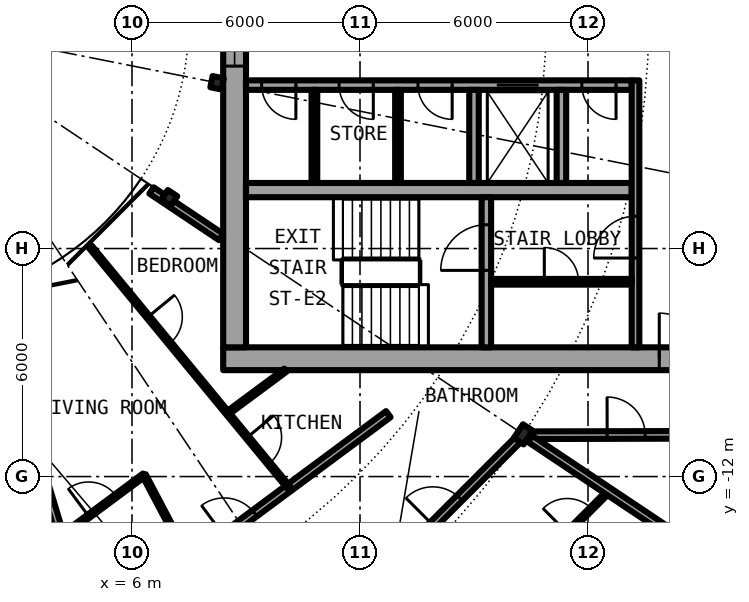
"""IFC4 building model, lengths in metres.
Left out: names, types, materials, properties, quantities, classifications, styles, units other than length and angle.
Written with IfcOpenShell. Run it as: python <this file> out.ifc"""

import sys

from ifc_helpers import new_model, si_unit, direction, frame, frame_2d, origin, origin_2d, place, context, subcontext, project, spatial, rectangle, i_section, extrude, element, fill, save


model = new_model("IFC4")
c1 = context("Model", 3, precision=1e-05, world=origin(), true_north=direction((0.0, 1.0)))
c2 = subcontext(c1, "Body", "Model", "MODEL_VIEW")
j1 = project(units=[si_unit("LENGTHUNIT", "METRE"), si_unit("PLANEANGLEUNIT", "RADIAN")], contexts=[c1])
p1 = place(None, origin())
s1 = spatial("IfcSite", under=j1, at=p1, CompositionType="ELEMENT")
p2 = place(p1, origin())
s2 = spatial("IfcBuilding", under=s1, at=p2, CompositionType="ELEMENT")
p3 = place(p2, frame((0.0, 0.0, 123.85)))
s3 = spatial("IfcBuildingStorey", under=s2, at=p3, CompositionType="ELEMENT", Elevation=123.85)
p4 = place(p3, frame((16.297, -10.889, 0.0), z_axis=(0.0, 0.0, 1.0), x_axis=(0.831469612303, -0.55557023302, 0.0)))
e1 = element("IfcColumn", 1, at=p4, inside=s3, PredefinedType="COLUMN", context=c2, shape_type="SweptSolid", body=[
    extrude(i_section(OverallWidth=0.307, OverallDepth=0.432, WebThickness=0.021, FlangeThickness=0.04, FilletRadius=0.027, at=origin_2d()), origin(), (0.0, 0.0, 1.0), 3.05),
])
for number, where, z_axis, x_axis in (
    (2, (6.984, -4.667, 0.0), (0.0, 0.0, 1.0), (0.831, -0.556, 0.0)),
    (3, (8.239, -1.639, 0.0), (0.0, 0.0, 1.0), (0.981, -0.195, 0.0)),
):
    element("IfcColumn", number, at=place(p3, frame(where, z_axis=z_axis, x_axis=x_axis)), inside=s3, PredefinedType="COLUMN", context=c2, shape_type="SweptSolid", body=[
        extrude(i_section(OverallWidth=0.3, OverallDepth=0.3, WebThickness=0.011, FlangeThickness=0.019, FilletRadius=0.027, at=origin_2d()), origin(), (0.0, 0.0, 1.0), 3.05),
    ])
p5 = place(p3, frame((8.4, -8.9, 0.0), z_axis=(0.0, 0.0, 1.0), x_axis=(1.0, 0.0, 0.0)))
e4 = element("IfcWall", 4, at=p5, inside=s3, PredefinedType="SHEAR", context=c2, shape_type="SweptSolid", body=[
    extrude(rectangle(XDim=13.8, YDim=0.6, at=frame_2d((6.9, 0.0))), origin(), (0.0, 0.0, 1.0), 3.05),
])
p6 = place(p5, frame((11.475, 0.0, 0.0)))
e5 = element("IfcOpeningElement", 5, at=p6, cuts=e4, PredefinedType="OPENING", context=c2, shape_type="SweptSolid", body=[
    extrude(rectangle(XDim=1.2, YDim=2.3, at=frame_2d((0.6, 1.15))), frame((0.0, 0.31, 0.0), z_axis=(0.0, -1.0, 0.0), x_axis=(1.0, 0.0, 0.0)), (0.0, 0.0, 1.0), 0.62),
])
p7 = place(p3, frame((8.7, -8.6, 0.0), z_axis=(0.0, 0.0, 1.0), x_axis=(0.0, 1.0, 0.0)))
e6 = element("IfcWall", 6, at=p7, inside=s3, PredefinedType="SHEAR", context=c2, shape_type="SweptSolid", body=[
    extrude(rectangle(XDim=17.2, YDim=0.6, at=frame_2d((8.6, 0.0))), origin(), (0.0, 0.0, 1.0), 3.05),
])
p8 = place(p7, frame((7.4, 0.0, 0.1)))
e7 = element("IfcOpeningElement", 7, at=p8, cuts=e6, PredefinedType="OPENING", context=c2, shape_type="SweptSolid", body=[
    extrude(rectangle(XDim=2.4, YDim=2.2, at=frame_2d((1.2, 1.1))), frame((0.0, 0.31, 0.0), z_axis=(0.0, -1.0, 0.0), x_axis=(1.0, 0.0, 0.0)), (0.0, 0.0, 1.0), 0.62),
])
p9 = place(p3, frame((19.15, -1.7, 0.0), z_axis=(0.0, 0.0, 1.0), x_axis=(-1.0, 0.0, 0.0)))
e8 = element("IfcWall", 8, at=p9, inside=s3, PredefinedType="SHEAR", context=c2, shape_type="SweptSolid", body=[
    extrude(rectangle(XDim=10.15, YDim=0.25, at=frame_2d((5.075, 0.0))), origin(), (0.0, 0.0, 1.0), 3.05),
])
p10 = place(p9, frame((2.45, 0.0, 0.0)))
e9 = element("IfcOpeningElement", 9, at=p10, cuts=e8, PredefinedType="OPENING", context=c2, shape_type="SweptSolid", body=[
    extrude(rectangle(XDim=1.1, YDim=2.3, at=frame_2d((0.55, 1.15))), frame((0.0, 0.135, 0.0), z_axis=(0.0, -1.0, 0.0), x_axis=(1.0, 0.0, 0.0)), (0.0, 0.0, 1.0), 0.27),
])
p11 = place(p9, frame((8.837, 0.0, 0.0)))
e10 = element("IfcOpeningElement", 10, at=p11, cuts=e8, PredefinedType="OPENING", context=c2, shape_type="SweptSolid", body=[
    extrude(rectangle(XDim=0.9, YDim=2.3, at=frame_2d((0.45, 1.15))), frame((0.0, 0.135, 0.0), z_axis=(0.0, -1.0, 0.0), x_axis=(1.0, 0.0, 0.0)), (0.0, 0.0, 1.0), 0.27),
])
p12 = place(p9, frame((6.8, 0.0, 0.0)))
e11 = element("IfcOpeningElement", 11, at=p12, cuts=e8, PredefinedType="OPENING", context=c2, shape_type="SweptSolid", body=[
    extrude(rectangle(XDim=0.9, YDim=2.3, at=frame_2d((0.45, 1.15))), frame((0.0, 0.135, 0.0), z_axis=(0.0, -1.0, 0.0), x_axis=(1.0, 0.0, 0.0)), (0.0, 0.0, 1.0), 0.27),
])
p13 = place(p9, frame((4.725, 0.0, 0.0)))
e12 = element("IfcOpeningElement", 12, at=p13, cuts=e8, PredefinedType="OPENING", context=c2, shape_type="SweptSolid", body=[
    extrude(rectangle(XDim=0.9, YDim=2.3, at=frame_2d((0.45, 1.15))), frame((0.0, 0.135, 0.0), z_axis=(0.0, -1.0, 0.0), x_axis=(1.0, 0.0, 0.0)), (0.0, 0.0, 1.0), 0.27),
])
p14 = place(p9, frame((0.413, 0.0, 0.0)))
e13 = element("IfcOpeningElement", 13, at=p14, cuts=e8, PredefinedType="OPENING", context=c2, shape_type="SweptSolid", body=[
    extrude(rectangle(XDim=0.9, YDim=2.3, at=frame_2d((0.45, 1.15))), frame((0.0, 0.135, 0.0), z_axis=(0.0, -1.0, 0.0), x_axis=(1.0, 0.0, 0.0)), (0.0, 0.0, 1.0), 0.27),
])
p15 = place(p3, frame((9.0, -4.462, 0.0), z_axis=(0.0, 0.0, 1.0), x_axis=(1.0, 0.0, 0.0)))
e14 = element("IfcWall", 14, at=p15, inside=s3, PredefinedType="SHEAR", context=c2, shape_type="SweptSolid", body=[
    extrude(rectangle(XDim=10.15, YDim=0.375, at=frame_2d((5.075, 0.0))), origin(), (0.0, 0.0, 1.0), 3.05),
])
p16 = place(p3, frame((15.325, -8.6, 0.0), z_axis=(0.0, 0.0, 1.0), x_axis=(0.0, 1.0, 0.0)))
e15 = element("IfcWall", 15, at=p16, inside=s3, PredefinedType="SHEAR", context=c2, shape_type="SweptSolid", body=[
    extrude(rectangle(XDim=3.95, YDim=0.25, at=frame_2d((1.975, 0.0))), origin(), (0.0, 0.0, 1.0), 3.05),
])
p17 = place(p16, frame((2.025, 0.0, 0.0)))
e16 = element("IfcOpeningElement", 16, at=p17, cuts=e15, PredefinedType="OPENING", context=c2, shape_type="SweptSolid", body=[
    extrude(rectangle(XDim=1.2, YDim=2.3, at=frame_2d((0.6, 1.15))), frame((0.0, 0.135, 0.0), z_axis=(0.0, -1.0, 0.0), x_axis=(1.0, 0.0, 0.0)), (0.0, 0.0, 1.0), 0.27),
])
for number, where, z_axis, x_axis in (
    (17, (15.0, -1.825, 0.0), (0.0, 0.0, 1.0), (0.0, -1.0, 0.0)),
    (18, (17.3, -1.825, 0.0), (0.0, 0.0, 1.0), (0.0, -1.0, 0.0)),
):
    element("IfcWall", number, at=place(p3, frame(where, z_axis=z_axis, x_axis=x_axis)), inside=s3, PredefinedType="SOLIDWALL", context=c2, shape_type="SweptSolid", body=[
        extrude(rectangle(XDim=2.45, YDim=0.25, at=frame_2d((1.225, 0.0))), origin(), (0.0, 0.0, 1.0), 2.7),
    ])
p18 = place(p3, frame((19.25, -8.6, 0.0), z_axis=(0.0, 0.0, 1.0), x_axis=(0.0, 1.0, 0.0)))
e19 = element("IfcWall", 19, at=p18, inside=s3, PredefinedType="SOLIDWALL", context=c2, shape_type="SweptSolid", body=[
    extrude(rectangle(XDim=7.025, YDim=0.2, at=frame_2d((3.513, 0.0))), origin(), (0.0, 0.0, 1.0), 2.7),
])
p19 = place(p18, frame((2.35, 0.0, 0.0)))
e20 = element("IfcOpeningElement", 20, at=p19, cuts=e19, PredefinedType="OPENING", context=c2, shape_type="SweptSolid", body=[
    extrude(rectangle(XDim=1.1, YDim=2.3, at=frame_2d((0.55, 1.15))), frame((0.0, 0.11, 0.0), z_axis=(0.0, -1.0, 0.0), x_axis=(1.0, 0.0, 0.0)), (0.0, 0.0, 1.0), 0.22),
])
for number, where, z_axis, x_axis in (
    (21, (10.8, -1.825, 0.0), (0.0, 0.0, 1.0), (0.0, -1.0, 0.0)),
    (22, (13.0, -1.825, 0.0), (0.0, 0.0, 1.0), (0.0, -1.0, 0.0)),
):
    element("IfcWall", number, at=place(p3, frame(where, z_axis=z_axis, x_axis=x_axis)), inside=s3, PredefinedType="PARTITIONING", context=c2, shape_type="SweptSolid", body=[
        extrude(rectangle(XDim=2.45, YDim=0.15, at=frame_2d((1.225, 0.0))), origin(), (0.0, 0.0, 1.0), 2.7),
    ])
p20 = place(p3, frame((15.45, -6.875, 0.0), z_axis=(0.0, 0.0, 1.0), x_axis=(1.0, 0.0, 0.0)))
e23 = element("IfcWall", 23, at=p20, inside=s3, PredefinedType="PARTITIONING", context=c2, shape_type="SweptSolid", body=[
    extrude(rectangle(XDim=3.7, YDim=0.15, at=frame_2d((1.85, 0.0))), origin(), (0.0, 0.0, 1.0), 2.7),
])
p21 = place(p20, frame((1.4, 0.0, 0.0)))
e24 = element("IfcOpeningElement", 24, at=p21, cuts=e23, PredefinedType="OPENING", context=c2, shape_type="SweptSolid", body=[
    extrude(rectangle(XDim=0.9, YDim=2.3, at=frame_2d((0.45, 1.15))), frame((0.0, 0.085, 0.0), z_axis=(0.0, -1.0, 0.0), x_axis=(1.0, 0.0, 0.0)), (0.0, 0.0, 1.0), 0.17),
])
p22 = place(p3, frame((15.468, -15.463, 0.0), z_axis=(0.0, 0.0, 1.0), x_axis=(0.707106781187, 0.707106781187, 0.0)))
e25 = element("IfcWall", 25, at=p22, inside=s3, PredefinedType="PARTITIONING", context=c2, shape_type="SweptSolid", body=[
    extrude(rectangle(XDim=4.351, YDim=0.1, at=frame_2d((2.176, 0.0))), origin(), (0.0, 0.0, 1.0), 2.7),
])
p23 = place(p22, frame((2.808, 0.0, 0.0)))
e26 = element("IfcOpeningElement", 26, at=p23, cuts=e25, PredefinedType="OPENING", context=c2, shape_type="SweptSolid", body=[
    extrude(rectangle(XDim=0.9, YDim=2.3, at=frame_2d((0.45, 1.15))), frame((0.0, 0.06, 0.0), z_axis=(0.0, -1.0, 0.0), x_axis=(1.0, 0.0, 0.0)), (0.0, 0.0, 1.0), 0.12),
])
p24 = place(p3, frame((11.0, -16.186, 0.0), z_axis=(0.0, 0.0, 1.0), x_axis=(0.707106781187, 0.707106781187, 0.0)))
e27 = element("IfcWall", 27, at=p24, inside=s3, PredefinedType="PARTITIONING", context=c2, shape_type="SweptSolid", body=[
    extrude(rectangle(XDim=7.334, YDim=0.2, at=frame_2d((3.667, 0.0))), origin(), (0.0, 0.0, 1.0), 2.39),
])
p25 = place(p24, frame((4.123, 0.0, 0.0)))
e28 = element("IfcOpeningElement", 28, at=p25, cuts=e27, PredefinedType="OPENING", context=c2, shape_type="SweptSolid", body=[
    extrude(rectangle(XDim=1.0, YDim=2.3, at=frame_2d((0.5, 1.15))), frame((0.0, 0.11, 0.0), z_axis=(0.0, -1.0, 0.0), x_axis=(1.0, 0.0, 0.0)), (0.0, 0.0, 1.0), 0.22),
])
p26 = place(p3, frame((4.906, -16.172, 0.0), z_axis=(0.0, 0.0, 1.0), x_axis=(0.803191461888, 0.595720971219, 0.0)))
e29 = element("IfcWall", 29, at=p26, inside=s3, PredefinedType="PARTITIONING", context=c2, shape_type="SweptSolid", body=[
    extrude(rectangle(XDim=9.76, YDim=0.2, at=frame_2d((4.88, 0.0))), origin(), (0.0, 0.0, 1.0), 2.7),
])
p27 = place(p26, frame((4.38, 0.0, 0.0)))
e30 = element("IfcOpeningElement", 30, at=p27, cuts=e29, PredefinedType="OPENING", context=c2, shape_type="SweptSolid", body=[
    extrude(rectangle(XDim=1.0, YDim=2.3, at=frame_2d((0.5, 1.15))), frame((0.0, 0.11, 0.0), z_axis=(0.0, -1.0, 0.0), x_axis=(1.0, 0.0, 0.0)), (0.0, 0.0, 1.0), 0.22),
])
p28 = place(p3, frame((4.122, -13.589, 0.0), z_axis=(0.0, 0.0, 1.0), x_axis=(0.803128348509, 0.595806055542, 0.0)))
e31 = element("IfcWall", 31, at=p28, inside=s3, PredefinedType="PARTITIONING", context=c2, shape_type="SweptSolid", body=[
    extrude(rectangle(XDim=2.734, YDim=0.1, at=frame_2d((1.367, 0.0))), origin(), (0.0, 0.0, 1.0), 2.7),
])
p29 = place(p28, frame((0.917, 0.0, 0.0)))
e32 = element("IfcOpeningElement", 32, at=p29, cuts=e31, PredefinedType="OPENING", context=c2, shape_type="SweptSolid", body=[
    extrude(rectangle(XDim=0.9, YDim=2.3, at=frame_2d((0.45, 1.15))), frame((0.0, 0.06, 0.0), z_axis=(0.0, -1.0, 0.0), x_axis=(1.0, 0.0, 0.0)), (0.0, 0.0, 1.0), 0.12),
])
p30 = place(p3, frame((8.513, -10.332, 0.0), z_axis=(0.0, 0.0, 1.0), x_axis=(0.803149591038, 0.595777420196, 0.0)))
e33 = element("IfcWall", 33, at=p30, inside=s3, PredefinedType="PARTITIONING", context=c2, shape_type="SweptSolid", body=[
    extrude(rectangle(XDim=1.9, YDim=0.1, at=frame_2d((0.95, 0.0))), origin(), (0.0, 0.0, 1.0), 2.7),
])
p31 = place(p3, frame((16.541, -10.912, 0.0), z_axis=(0.0, 0.0, 1.0), x_axis=(0.999997173357, 0.002377662213, 0.0)))
e34 = element("IfcWall", 34, at=p31, inside=s3, PredefinedType="PARTITIONING", context=c2, shape_type="SweptSolid", body=[
    extrude(rectangle(XDim=5.134, YDim=0.2, at=frame_2d((2.567, 0.0))), origin(), (0.0, 0.0, 1.0), 2.7),
])
p32 = place(p31, frame((1.963, 0.0, 0.0)))
e35 = element("IfcOpeningElement", 35, at=p32, cuts=e34, PredefinedType="OPENING", context=c2, shape_type="SweptSolid", body=[
    extrude(rectangle(XDim=1.0, YDim=2.3, at=frame_2d((0.5, 1.15))), frame((0.0, 0.11, 0.0), z_axis=(0.0, -1.0, 0.0), x_axis=(1.0, 0.0, 0.0)), (0.0, 0.0, 1.0), 0.22),
])
p33 = place(p3, frame((6.513, -4.472, 0.0), z_axis=(0.0, 0.0, 1.0), x_axis=(0.831333375071, -0.555774072347, 0.0)))
e36 = element("IfcWall", 36, at=p33, inside=s3, PredefinedType="PARTITIONING", context=c2, shape_type="SweptSolid", body=[
    extrude(rectangle(XDim=2.203, YDim=0.2, at=frame_2d((1.101, 0.0))), origin(), (0.0, 0.0, 1.0), 2.7),
])
p34 = place(p3, frame((2.24, -7.388, 0.0), z_axis=(0.0, 0.0, 1.0), x_axis=(0.290420725025, -0.956899055531, 0.0)))
e37 = element("IfcWall", 37, at=p34, inside=s3, PredefinedType="PARTITIONING", context=c2, shape_type="SweptSolid", body=[
    extrude(rectangle(XDim=9.18, YDim=0.2, at=frame_2d((4.59, 0.0))), origin(), (0.0, 0.0, 1.0), 2.7),
])
p35 = place(p3, frame((4.908, -5.959, 0.0), z_axis=(0.0, 0.0, 1.0), x_axis=(0.636105207978, -0.771602335652, 0.0)))
e38 = element("IfcWall", 38, at=p35, inside=s3, PredefinedType="PARTITIONING", context=c2, shape_type="SweptSolid", body=[
    extrude(rectangle(XDim=8.213, YDim=0.1, at=frame_2d((4.106, 0.0))), origin(), (0.0, 0.0, 1.0), 2.7),
])
p36 = place(p35, frame((6.49, 0.0, 0.0)))
e39 = element("IfcOpeningElement", 39, at=p36, cuts=e38, PredefinedType="OPENING", context=c2, shape_type="SweptSolid", body=[
    extrude(rectangle(XDim=0.9, YDim=2.3, at=frame_2d((0.45, 1.15))), frame((0.0, 0.06, 0.0), z_axis=(0.0, -1.0, 0.0), x_axis=(1.0, 0.0, 0.0)), (0.0, 0.0, 1.0), 0.12),
])
p37 = place(p35, frame((2.384, 0.0, 0.0)))
e40 = element("IfcOpeningElement", 40, at=p37, cuts=e38, PredefinedType="OPENING", context=c2, shape_type="SweptSolid", body=[
    extrude(rectangle(XDim=0.9, YDim=2.3, at=frame_2d((0.45, 1.15))), frame((0.0, 0.06, 0.0), z_axis=(0.0, -1.0, 0.0), x_axis=(1.0, 0.0, 0.0)), (0.0, 0.0, 1.0), 0.12),
])
p38 = place(p3, frame((6.316, -11.961, 0.0), z_axis=(0.0, 0.0, 1.0), x_axis=(0.467037016128, -0.884237765291, 0.0)))
e41 = element("IfcWall", 41, at=p38, inside=s3, PredefinedType="PARTITIONING", context=c2, shape_type="SweptSolid", body=[
    extrude(rectangle(XDim=2.572, YDim=0.1, at=frame_2d((1.286, 0.0))), origin(), (0.0, 0.0, 1.0), 2.7),
])
p39 = place(p3, frame((16.477, -11.009, 0.0), z_axis=(0.0, 0.0, 1.0), x_axis=(0.831467903109, -0.555572791, 0.0)))
e42 = element("IfcWall", 42, at=p39, inside=s3, PredefinedType="PARTITIONING", context=c2, shape_type="SweptSolid", body=[
    extrude(rectangle(XDim=7.358, YDim=0.2, at=frame_2d((3.679, 0.0))), origin(), (0.0, 0.0, 1.0), 2.7),
])
p40 = place(p10, origin())
e43 = element("IfcDoor", 43, at=p40, inside=s3, OperationType="DOUBLE_DOOR_SLIDING", PredefinedType="DOOR", context=c2, shape_type="SweptSolid", body=[
    extrude(rectangle(XDim=1.1, YDim=2.3, at=frame_2d((0.55, 1.15))), frame((0.0, 0.025, 0.0), z_axis=(0.0, -1.0, 0.0), x_axis=(1.0, 0.0, 0.0)), (0.0, 0.0, 1.0), 0.05),
])
fill(e9, e43)
p41 = place(p11, origin())
e44 = element("IfcDoor", 44, at=p41, inside=s3, OperationType="SINGLE_SWING_LEFT", PredefinedType="DOOR", context=c2, shape_type="SweptSolid", body=[
    extrude(rectangle(XDim=0.9, YDim=2.3, at=frame_2d((0.45, 1.15))), frame((0.0, 0.025, 0.0), z_axis=(0.0, -1.0, 0.0), x_axis=(1.0, 0.0, 0.0)), (0.0, 0.0, 1.0), 0.05),
])
fill(e10, e44)
p42 = place(p12, origin())
e45 = element("IfcDoor", 45, at=p42, inside=s3, OperationType="SINGLE_SWING_LEFT", PredefinedType="DOOR", context=c2, shape_type="SweptSolid", body=[
    extrude(rectangle(XDim=0.9, YDim=2.3, at=frame_2d((0.45, 1.15))), frame((0.0, 0.025, 0.0), z_axis=(0.0, -1.0, 0.0), x_axis=(1.0, 0.0, 0.0)), (0.0, 0.0, 1.0), 0.05),
])
fill(e11, e45)
p43 = place(p13, origin())
e46 = element("IfcDoor", 46, at=p43, inside=s3, OperationType="SINGLE_SWING_LEFT", PredefinedType="DOOR", context=c2, shape_type="SweptSolid", body=[
    extrude(rectangle(XDim=0.9, YDim=2.3, at=frame_2d((0.45, 1.15))), frame((0.0, 0.025, 0.0), z_axis=(0.0, -1.0, 0.0), x_axis=(1.0, 0.0, 0.0)), (0.0, 0.0, 1.0), 0.05),
])
fill(e12, e46)
p44 = place(p14, origin())
e47 = element("IfcDoor", 47, at=p44, inside=s3, OperationType="SINGLE_SWING_RIGHT", PredefinedType="DOOR", context=c2, shape_type="SweptSolid", body=[
    extrude(rectangle(XDim=0.9, YDim=2.3, at=frame_2d((0.45, 1.15))), frame((0.0, 0.025, 0.0), z_axis=(0.0, -1.0, 0.0), x_axis=(1.0, 0.0, 0.0)), (0.0, 0.0, 1.0), 0.05),
])
fill(e13, e47)
p45 = place(p21, origin())
e48 = element("IfcDoor", 48, at=p45, inside=s3, OperationType="SINGLE_SWING_LEFT", PredefinedType="DOOR", context=c2, shape_type="SweptSolid", body=[
    extrude(rectangle(XDim=0.9, YDim=2.3, at=frame_2d((0.45, 1.15))), frame((0.0, 0.025, 0.0), z_axis=(0.0, -1.0, 0.0), x_axis=(1.0, 0.0, 0.0)), (0.0, 0.0, 1.0), 0.05),
])
fill(e24, e48)
p46 = place(p17, origin())
e49 = element("IfcDoor", 49, at=p46, inside=s3, OperationType="SINGLE_SWING_LEFT", PredefinedType="DOOR", context=c2, shape_type="SweptSolid", body=[
    extrude(rectangle(XDim=1.2, YDim=2.3, at=frame_2d((0.6, 1.15))), frame((0.0, 0.025, 0.0), z_axis=(0.0, -1.0, 0.0), x_axis=(1.0, 0.0, 0.0)), (0.0, 0.0, 1.0), 0.05),
])
fill(e16, e49)
p47 = place(p19, origin())
e50 = element("IfcDoor", 50, at=p47, inside=s3, OperationType="SINGLE_SWING_RIGHT", PredefinedType="DOOR", context=c2, shape_type="SweptSolid", body=[
    extrude(rectangle(XDim=1.1, YDim=2.3, at=frame_2d((0.55, 1.15))), frame((0.0, 0.025, 0.0), z_axis=(0.0, -1.0, 0.0), x_axis=(1.0, 0.0, 0.0)), (0.0, 0.0, 1.0), 0.05),
])
fill(e20, e50)
p48 = place(p6, origin())
e51 = element("IfcDoor", 51, at=p48, inside=s3, OperationType="SINGLE_SWING_LEFT", PredefinedType="DOOR", context=c2, shape_type="SweptSolid", body=[
    extrude(rectangle(XDim=1.2, YDim=2.3, at=frame_2d((0.6, 1.15))), frame((0.0, 0.025, 0.0), z_axis=(0.0, -1.0, 0.0), x_axis=(1.0, 0.0, 0.0)), (0.0, 0.0, 1.0), 0.05),
])
fill(e5, e51)
p49 = place(p8, origin())
e52 = element("IfcWindow", 52, at=p49, inside=s3, PartitioningType="SINGLE_PANEL", PredefinedType="WINDOW", context=c2, shape_type="SweptSolid", body=[
    extrude(rectangle(XDim=2.4, YDim=2.2, at=frame_2d((1.2, 1.1))), frame((0.0, 0.03, 0.0), z_axis=(0.0, -1.0, 0.0), x_axis=(1.0, 0.0, 0.0)), (0.0, 0.0, 1.0), 0.06),
])
fill(e7, e52)
p50 = place(p25, origin())
e53 = element("IfcDoor", 53, at=p50, inside=s3, OperationType="SINGLE_SWING_RIGHT", PredefinedType="DOOR", context=c2, shape_type="SweptSolid", body=[
    extrude(rectangle(XDim=1.0, YDim=2.3, at=frame_2d((0.5, 1.15))), frame((0.0, 0.025, 0.0), z_axis=(0.0, -1.0, 0.0), x_axis=(1.0, 0.0, 0.0)), (0.0, 0.0, 1.0), 0.05),
])
fill(e28, e53)
p51 = place(p23, origin())
e54 = element("IfcDoor", 54, at=p51, inside=s3, OperationType="SINGLE_SWING_RIGHT", PredefinedType="DOOR", context=c2, shape_type="SweptSolid", body=[
    extrude(rectangle(XDim=0.9, YDim=2.3, at=frame_2d((0.45, 1.15))), frame((0.0, 0.025, 0.0), z_axis=(0.0, -1.0, 0.0), x_axis=(1.0, 0.0, 0.0)), (0.0, 0.0, 1.0), 0.05),
])
fill(e26, e54)
p52 = place(p27, origin())
e55 = element("IfcDoor", 55, at=p52, inside=s3, OperationType="SINGLE_SWING_LEFT", PredefinedType="DOOR", context=c2, shape_type="SweptSolid", body=[
    extrude(rectangle(XDim=1.0, YDim=2.3, at=frame_2d((0.5, 1.15))), frame((0.0, 0.025, 0.0), z_axis=(0.0, -1.0, 0.0), x_axis=(1.0, 0.0, 0.0)), (0.0, 0.0, 1.0), 0.05),
])
fill(e30, e55)
p53 = place(p29, origin())
e56 = element("IfcDoor", 56, at=p53, inside=s3, OperationType="SINGLE_SWING_RIGHT", PredefinedType="DOOR", context=c2, shape_type="SweptSolid", body=[
    extrude(rectangle(XDim=0.9, YDim=2.3, at=frame_2d((0.45, 1.15))), frame((0.0, 0.025, 0.0), z_axis=(0.0, -1.0, 0.0), x_axis=(1.0, 0.0, 0.0)), (0.0, 0.0, 1.0), 0.05),
])
fill(e32, e56)
p54 = place(p36, origin())
e57 = element("IfcDoor", 57, at=p54, inside=s3, OperationType="SINGLE_SWING_RIGHT", PredefinedType="DOOR", context=c2, shape_type="SweptSolid", body=[
    extrude(rectangle(XDim=0.9, YDim=2.3, at=frame_2d((0.45, 1.15))), frame((0.0, 0.025, 0.0), z_axis=(0.0, -1.0, 0.0), x_axis=(1.0, 0.0, 0.0)), (0.0, 0.0, 1.0), 0.05),
])
fill(e39, e57)
p55 = place(p37, origin())
e58 = element("IfcDoor", 58, at=p55, inside=s3, OperationType="SINGLE_SWING_LEFT", PredefinedType="DOOR", context=c2, shape_type="SweptSolid", body=[
    extrude(rectangle(XDim=0.9, YDim=2.3, at=frame_2d((0.45, 1.15))), frame((0.0, 0.025, 0.0), z_axis=(0.0, -1.0, 0.0), x_axis=(1.0, 0.0, 0.0)), (0.0, 0.0, 1.0), 0.05),
])
fill(e40, e58)
p56 = place(p32, origin())
e59 = element("IfcDoor", 59, at=p56, inside=s3, OperationType="SINGLE_SWING_LEFT", PredefinedType="DOOR", context=c2, shape_type="SweptSolid", body=[
    extrude(rectangle(XDim=1.0, YDim=2.3, at=frame_2d((0.5, 1.15))), frame((0.0, 0.025, 0.0), z_axis=(0.0, -1.0, 0.0), x_axis=(1.0, 0.0, 0.0)), (0.0, 0.0, 1.0), 0.05),
])
fill(e35, e59)
save(model, sys.argv[1])
